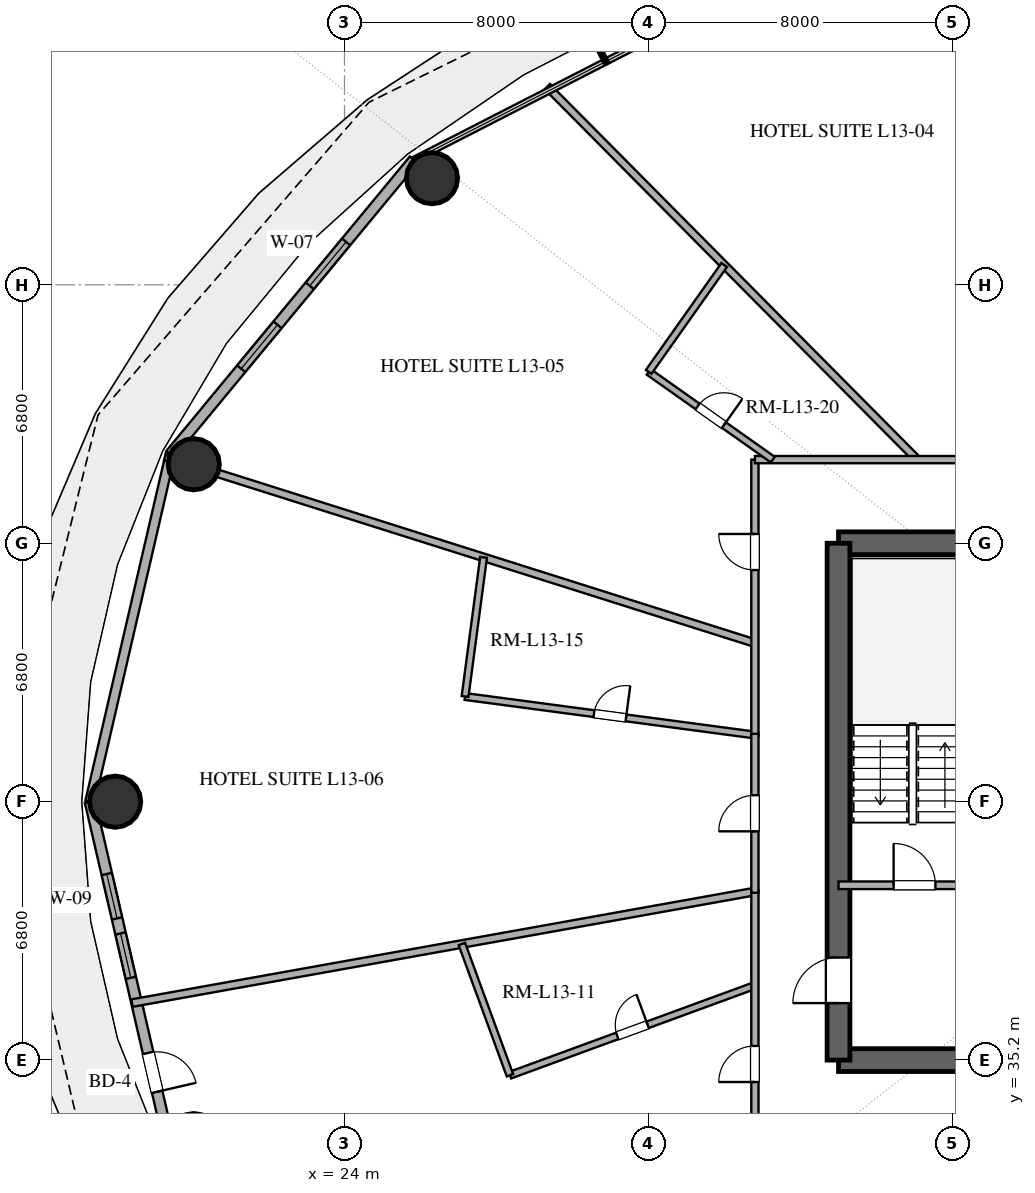
"""IFC4 building model, lengths in metres.
Left out: names, types, materials, properties, quantities, classifications, styles, units other than length and angle.
Written with IfcOpenShell. Run it as: python <this file> out.ifc"""

import sys

from ifc_helpers import new_model, si_unit, direction, frame, frame_2d, origin, origin_2d, place, context, subcontext, project, spatial, rectangle, hollow_circle, extrude, element, fill, save


model = new_model("IFC4")
c1 = context("Model", 3, precision=1e-05, world=origin(), true_north=direction((0.0, 1.0)))
c2 = subcontext(c1, "Body", "Model", "MODEL_VIEW")
j1 = project(units=[si_unit("LENGTHUNIT", "METRE"), si_unit("PLANEANGLEUNIT", "RADIAN")], contexts=[c1])
p1 = place(None, origin())
s1 = spatial("IfcSite", under=j1, at=p1, CompositionType="ELEMENT")
p2 = place(p1, origin())
s2 = spatial("IfcBuilding", under=s1, at=p2, CompositionType="ELEMENT")
p3 = place(p2, frame((0.0, 0.0, 57.0)))
s3 = spatial("IfcBuildingStorey", under=s2, at=p3, CompositionType="ELEMENT", Elevation=57.0)
for number, where, z_axis, x_axis in (
    (1, (37.0, 35.2, 0.0), (0.0, 0.0, 1.0), (1.0, 0.0, 0.0)),
    (2, (37.0, 48.8, 0.0), (0.0, 0.0, 1.0), (1.0, 0.0, 0.0)),
):
    element("IfcWall", number, at=place(p3, frame(where, z_axis=z_axis, x_axis=x_axis)), inside=s3, PredefinedType="SHEAR", context=c2, shape_type="SweptSolid", body=[
        extrude(rectangle(XDim=4.0, YDim=0.6, at=frame_2d((2.0, 0.0))), origin(), (0.0, 0.0, 1.0), 3.38),
    ])
p4 = place(p3, frame((37.0, 35.2, 0.0), z_axis=(0.0, 0.0, 1.0), x_axis=(0.0, 1.0, 0.0)))
e3 = element("IfcWall", 3, at=p4, inside=s3, PredefinedType="SHEAR", context=c2, shape_type="SweptSolid", body=[
    extrude(rectangle(XDim=13.6, YDim=0.6, at=frame_2d((6.8, 0.0))), origin(), (0.0, 0.0, 1.0), 3.38),
])
p5 = place(p4, frame((1.5, 0.0, 0.0)))
e4 = element("IfcOpeningElement", 4, at=p5, cuts=e3, PredefinedType="OPENING", context=c2, shape_type="SweptSolid", body=[
    extrude(rectangle(XDim=1.2, YDim=2.15, at=frame_2d((0.6, 1.075))), frame((0.0, 0.31, 0.0), z_axis=(0.0, -1.0, 0.0), x_axis=(1.0, 0.0, 0.0)), (0.0, 0.0, 1.0), 0.62),
])
for number, where, z_axis, x_axis in (
    (5, (26.303, 58.405, 0.0), (0.0, 0.0, 1.0), (1.0, 0.0, 0.0)),
    (6, (20.034, 50.878, 0.0), (0.0, 0.0, 1.0), (1.0, 0.0, 0.0)),
    (7, (17.965, 42.0, 0.0), (0.0, 0.0, 1.0), (1.0, 0.0, 0.0)),
):
    element("IfcColumn", number, at=place(p3, frame(where, z_axis=z_axis, x_axis=x_axis)), inside=s3, PredefinedType="COLUMN", context=c2, shape_type="SweptSolid", body=[
        extrude(hollow_circle(Radius=0.675, WallThickness=0.036, at=origin_2d()), origin(), (0.0, 0.0, 1.0), 3.38),
    ])
p6 = place(p3, frame((25.826, 58.886, 0.0), z_axis=(0.0, 0.0, 1.0), x_axis=(-0.637296809613, -0.770618437657, 0.0)))
e8 = element("IfcWall", 8, at=p6, inside=s3, PredefinedType="SOLIDWALL", context=c2, shape_type="SweptSolid", body=[
    extrude(rectangle(XDim=10.053, YDim=0.28, at=frame_2d((5.027, 0.0))), origin(), (0.0, 0.0, 1.0), 3.38),
])
p7 = place(p6, frame((2.798, 0.0, 0.85)))
e9 = element("IfcOpeningElement", 9, at=p7, cuts=e8, PredefinedType="OPENING", context=c2, shape_type="SweptSolid", body=[
    extrude(rectangle(XDim=1.5, YDim=1.8, at=frame_2d((0.75, 0.9))), frame((0.0, 0.15, 0.0), z_axis=(0.0, -1.0, 0.0), x_axis=(1.0, 0.0, 0.0)), (0.0, 0.0, 1.0), 0.3),
])
p8 = place(p6, frame((5.63, 0.0, 0.85)))
e10 = element("IfcOpeningElement", 10, at=p8, cuts=e8, PredefinedType="OPENING", context=c2, shape_type="SweptSolid", body=[
    extrude(rectangle(XDim=1.5, YDim=1.8, at=frame_2d((0.75, 0.9))), frame((0.0, 0.15, 0.0), z_axis=(0.0, -1.0, 0.0), x_axis=(1.0, 0.0, 0.0)), (0.0, 0.0, 1.0), 0.3),
])
p9 = place(p3, frame((19.419, 51.138, 0.0), z_axis=(0.0, 0.0, 1.0), x_axis=(-0.225454452941, -0.974253709076, 0.0)))
e11 = element("IfcWall", 11, at=p9, inside=s3, PredefinedType="SOLIDWALL", context=c2, shape_type="SweptSolid", body=[
    extrude(rectangle(XDim=9.38, YDim=0.25, at=frame_2d((4.69, 0.0))), origin(), (0.0, 0.0, 1.0), 3.38),
])
p10 = place(p3, frame((17.304, 42.0, 0.0), z_axis=(0.0, 0.0, 1.0), x_axis=(0.225454452941, -0.974253709076, 0.0)))
e12 = element("IfcWall", 12, at=p10, inside=s3, PredefinedType="SOLIDWALL", context=c2, shape_type="SweptSolid", body=[
    extrude(rectangle(XDim=9.38, YDim=0.28, at=frame_2d((4.69, 0.0))), origin(), (0.0, 0.0, 1.0), 3.38),
])
p11 = place(p10, frame((1.953, 0.0, 0.85)))
e13 = element("IfcOpeningElement", 13, at=p11, cuts=e12, PredefinedType="OPENING", context=c2, shape_type="SweptSolid", body=[
    extrude(rectangle(XDim=1.2, YDim=1.8, at=frame_2d((0.6, 0.9))), frame((0.0, 0.15, 0.0), z_axis=(0.0, -1.0, 0.0), x_axis=(1.0, 0.0, 0.0)), (0.0, 0.0, 1.0), 0.3),
])
p12 = place(p10, frame((3.558, 0.0, 0.85)))
e14 = element("IfcOpeningElement", 14, at=p12, cuts=e12, PredefinedType="OPENING", context=c2, shape_type="SweptSolid", body=[
    extrude(rectangle(XDim=1.2, YDim=1.8, at=frame_2d((0.6, 0.9))), frame((0.0, 0.15, 0.0), z_axis=(0.0, -1.0, 0.0), x_axis=(1.0, 0.0, 0.0)), (0.0, 0.0, 1.0), 0.3),
])
p13 = place(p10, frame((6.785, 0.0, 0.0)))
e15 = element("IfcOpeningElement", 15, at=p13, cuts=e12, PredefinedType="OPENING", context=c2, shape_type="SweptSolid", body=[
    extrude(rectangle(XDim=1.05, YDim=2.2, at=frame_2d((0.525, 1.1))), frame((0.0, 0.15, 0.0), z_axis=(0.0, -1.0, 0.0), x_axis=(1.0, 0.0, 0.0)), (0.0, 0.0, 1.0), 0.3),
])
p14 = place(p3, frame((37.0, 39.8, 0.0), z_axis=(0.0, 0.0, 1.0), x_axis=(1.0, 0.0, 0.0)))
e16 = element("IfcWall", 16, at=p14, inside=s3, PredefinedType="SOLIDWALL", context=c2, shape_type="SweptSolid", body=[
    extrude(rectangle(XDim=4.0, YDim=0.2, at=frame_2d((2.0, 0.0))), origin(), (0.0, 0.0, 1.0), 2.74),
])
p15 = place(p14, frame((1.45, 0.0, 0.0)))
e17 = element("IfcOpeningElement", 17, at=p15, cuts=e16, PredefinedType="OPENING", context=c2, shape_type="SweptSolid", body=[
    extrude(rectangle(XDim=1.1, YDim=2.15, at=frame_2d((0.55, 1.075))), frame((0.0, 0.11, 0.0), z_axis=(0.0, -1.0, 0.0), x_axis=(1.0, 0.0, 0.0)), (0.0, 0.0, 1.0), 0.22),
])
p16 = place(p3, frame((34.8, 39.636, 0.0), z_axis=(0.0, 0.0, 1.0), x_axis=(-0.984338200058, -0.176290407871, 0.0)))
e18 = element("IfcWall", 18, at=p16, inside=s3, PredefinedType="PARTITIONING", context=c2, shape_type="SweptSolid", body=[
    extrude(rectangle(XDim=16.653, YDim=0.2, at=frame_2d((8.327, 0.0))), origin(), (0.0, 0.0, 1.0), 2.74),
])
p17 = place(p3, frame((34.8, 46.172, 0.0), z_axis=(0.0, 0.0, 1.0), x_axis=(-0.953511676516, 0.301356073023, 0.0)))
e19 = element("IfcWall", 19, at=p17, inside=s3, PredefinedType="PARTITIONING", context=c2, shape_type="SweptSolid", body=[
    extrude(rectangle(XDim=16.275, YDim=0.2, at=frame_2d((8.137, 0.0))), origin(), (0.0, 0.0, 1.0), 2.74),
])
p18 = place(p3, frame((27.173, 44.768, 0.0), z_axis=(0.0, 0.0, 1.0), x_axis=(0.991283239225, -0.131748015661, 0.0)))
e20 = element("IfcWall", 20, at=p18, inside=s3, PredefinedType="PLUMBINGWALL", context=c2, shape_type="SweptSolid", body=[
    extrude(rectangle(XDim=7.694, YDim=0.18, at=frame_2d((3.847, 0.0))), origin(), (0.0, 0.0, 1.0), 2.74),
])
p19 = place(p18, frame((3.422, 0.0, 0.0)))
e21 = element("IfcOpeningElement", 21, at=p19, cuts=e20, PredefinedType="OPENING", context=c2, shape_type="SweptSolid", body=[
    extrude(rectangle(XDim=0.85, YDim=2.1, at=frame_2d((0.425, 1.05))), frame((0.0, 0.1, 0.0), z_axis=(0.0, -1.0, 0.0), x_axis=(1.0, 0.0, 0.0)), (0.0, 0.0, 1.0), 0.2),
])
p20 = place(p3, frame((39.072, 51.0, 0.0), z_axis=(0.0, 0.0, 1.0), x_axis=(-0.704257683765, 0.70994444491, 0.0)))
e22 = element("IfcWall", 22, at=p20, inside=s3, PredefinedType="PARTITIONING", context=c2, shape_type="SweptSolid", body=[
    extrude(rectangle(XDim=13.824, YDim=0.2, at=frame_2d((6.912, 0.0))), origin(), (0.0, 0.0, 1.0), 2.74),
])
p21 = place(p3, frame((28.354, 34.802, 0.0), z_axis=(0.0, 0.0, 1.0), x_axis=(0.938953689431, 0.344043556986, 0.0)))
e23 = element("IfcWall", 23, at=p21, inside=s3, PredefinedType="PLUMBINGWALL", context=c2, shape_type="SweptSolid", body=[
    extrude(rectangle(XDim=6.865, YDim=0.18, at=frame_2d((3.433, 0.0))), origin(), (0.0, 0.0, 1.0), 2.74),
])
p22 = place(p21, frame((3.007, 0.0, 0.0)))
e24 = element("IfcOpeningElement", 24, at=p22, cuts=e23, PredefinedType="OPENING", context=c2, shape_type="SweptSolid", body=[
    extrude(rectangle(XDim=0.85, YDim=2.1, at=frame_2d((0.425, 1.05))), frame((0.0, 0.1, 0.0), z_axis=(0.0, -1.0, 0.0), x_axis=(1.0, 0.0, 0.0)), (0.0, 0.0, 1.0), 0.2),
])
p23 = place(p3, frame((34.8, 43.722, 0.0), z_axis=(0.0, 0.0, 1.0), x_axis=(0.0, 1.0, 0.0)))
e25 = element("IfcWall", 25, at=p23, inside=s3, PredefinedType="PARTITIONING", context=c2, shape_type="SweptSolid", body=[
    extrude(rectangle(XDim=7.278, YDim=0.19, at=frame_2d((3.639, 0.0))), origin(), (0.0, 0.0, 1.0), 2.74),
])
p24 = place(p23, frame((4.372, 0.0, 0.0)))
e26 = element("IfcOpeningElement", 26, at=p24, cuts=e25, PredefinedType="OPENING", context=c2, shape_type="SweptSolid", body=[
    extrude(rectangle(XDim=0.95, YDim=2.15, at=frame_2d((0.475, 1.075))), frame((0.0, 0.105, 0.0), z_axis=(0.0, -1.0, 0.0), x_axis=(1.0, 0.0, 0.0)), (0.0, 0.0, 1.0), 0.21),
])
p25 = place(p3, frame((34.8, 51.0, 0.0), z_axis=(0.0, 0.0, 1.0), x_axis=(1.0, 0.0, 0.0)))
e27 = element("IfcWall", 27, at=p25, inside=s3, PredefinedType="PARTITIONING", context=c2, shape_type="SweptSolid", body=[
    extrude(rectangle(XDim=8.641, YDim=0.19, at=frame_2d((4.32, 0.0))), origin(), (0.0, 0.0, 1.0), 2.74),
])
p26 = place(p25, frame((5.959, 0.0, 0.0)))
e28 = element("IfcOpeningElement", 28, at=p26, cuts=e27, PredefinedType="OPENING", context=c2, shape_type="SweptSolid", body=[
    extrude(rectangle(XDim=0.95, YDim=2.15, at=frame_2d((0.475, 1.075))), frame((0.0, 0.105, 0.0), z_axis=(0.0, -1.0, 0.0), x_axis=(1.0, 0.0, 0.0)), (0.0, 0.0, 1.0), 0.21),
])
p27 = place(p3, frame((34.8, 33.0, 0.0), z_axis=(0.0, 0.0, 1.0), x_axis=(0.0, 1.0, 0.0)))
e29 = element("IfcWall", 29, at=p27, inside=s3, PredefinedType="PARTITIONING", context=c2, shape_type="SweptSolid", body=[
    extrude(rectangle(XDim=6.668, YDim=0.19, at=frame_2d((3.334, 0.0))), origin(), (0.0, 0.0, 1.0), 2.74),
])
p28 = place(p27, frame((1.624, 0.0, 0.0)))
e30 = element("IfcOpeningElement", 30, at=p28, cuts=e29, PredefinedType="OPENING", context=c2, shape_type="SweptSolid", body=[
    extrude(rectangle(XDim=0.95, YDim=2.15, at=frame_2d((0.475, 1.075))), frame((0.0, 0.105, 0.0), z_axis=(0.0, -1.0, 0.0), x_axis=(1.0, 0.0, 0.0)), (0.0, 0.0, 1.0), 0.21),
])
p29 = place(p3, frame((34.8, 39.604, 0.0), z_axis=(0.0, 0.0, 1.0), x_axis=(0.0, 1.0, 0.0)))
e31 = element("IfcWall", 31, at=p29, inside=s3, PredefinedType="PARTITIONING", context=c2, shape_type="SweptSolid", body=[
    extrude(rectangle(XDim=4.183, YDim=0.19, at=frame_2d((2.091, 0.0))), origin(), (0.0, 0.0, 1.0), 2.74),
])
p30 = place(p29, frame((1.616, 0.0, 0.0)))
e32 = element("IfcOpeningElement", 32, at=p30, cuts=e31, PredefinedType="OPENING", context=c2, shape_type="SweptSolid", body=[
    extrude(rectangle(XDim=0.95, YDim=2.15, at=frame_2d((0.475, 1.075))), frame((0.0, 0.105, 0.0), z_axis=(0.0, -1.0, 0.0), x_axis=(1.0, 0.0, 0.0)), (0.0, 0.0, 1.0), 0.21),
])
p31 = place(p3, frame((32.005, 53.309, 0.0), z_axis=(0.0, 0.0, 1.0), x_axis=(0.816524416543, -0.577310901672, 0.0)))
e33 = element("IfcWall", 33, at=p31, inside=s3, PredefinedType="PLUMBINGWALL", context=c2, shape_type="SweptSolid", body=[
    extrude(rectangle(XDim=4.0, YDim=0.18, at=frame_2d((2.0, 0.0))), origin(), (0.0, 0.0, 1.0), 2.74),
])
p32 = place(p31, frame((1.575, 0.0, 0.0)))
e34 = element("IfcOpeningElement", 34, at=p32, cuts=e33, PredefinedType="OPENING", context=c2, shape_type="SweptSolid", body=[
    extrude(rectangle(XDim=0.85, YDim=2.1, at=frame_2d((0.425, 1.05))), frame((0.0, 0.1, 0.0), z_axis=(0.0, -1.0, 0.0), x_axis=(1.0, 0.0, 0.0)), (0.0, 0.0, 1.0), 0.2),
])
p33 = place(p3, frame((27.66, 48.428, 0.0), z_axis=(0.0, 0.0, 1.0), x_axis=(-0.131760975246, -0.991281516726, 0.0)))
e35 = element("IfcWall", 35, at=p33, inside=s3, PredefinedType="PLUMBINGWALL", context=c2, shape_type="SweptSolid", body=[
    extrude(rectangle(XDim=3.693, YDim=0.18, at=frame_2d((1.846, 0.0))), origin(), (0.0, 0.0, 1.0), 2.74),
])
p34 = place(p3, frame((27.089, 38.255, 0.0), z_axis=(0.0, 0.0, 1.0), x_axis=(0.344012760863, -0.938964972916, 0.0)))
e36 = element("IfcWall", 36, at=p34, inside=s3, PredefinedType="PLUMBINGWALL", context=c2, shape_type="SweptSolid", body=[
    extrude(rectangle(XDim=3.677, YDim=0.18, at=frame_2d((1.839, 0.0))), origin(), (0.0, 0.0, 1.0), 2.74),
])
p35 = place(p3, frame((33.993, 56.121, 0.0), z_axis=(0.0, 0.0, 1.0), x_axis=(-0.57730102799, -0.816531397487, 0.0)))
e37 = element("IfcWall", 37, at=p35, inside=s3, PredefinedType="PLUMBINGWALL", context=c2, shape_type="SweptSolid", body=[
    extrude(rectangle(XDim=3.443, YDim=0.18, at=frame_2d((1.722, 0.0))), origin(), (0.0, 0.0, 1.0), 2.74),
])
p36 = place(p7, origin())
e38 = element("IfcWindow", 38, at=p36, inside=s3, PartitioningType="SINGLE_PANEL", PredefinedType="WINDOW", context=c2, shape_type="SweptSolid", body=[
    extrude(rectangle(XDim=1.5, YDim=1.8, at=frame_2d((0.75, 0.9))), frame((0.0, 0.03, 0.0), z_axis=(0.0, -1.0, 0.0), x_axis=(1.0, 0.0, 0.0)), (0.0, 0.0, 1.0), 0.06),
])
fill(e9, e38)
p37 = place(p8, origin())
e39 = element("IfcWindow", 39, at=p37, inside=s3, PartitioningType="SINGLE_PANEL", PredefinedType="WINDOW", context=c2, shape_type="SweptSolid", body=[
    extrude(rectangle(XDim=1.5, YDim=1.8, at=frame_2d((0.75, 0.9))), frame((0.0, 0.03, 0.0), z_axis=(0.0, -1.0, 0.0), x_axis=(1.0, 0.0, 0.0)), (0.0, 0.0, 1.0), 0.06),
])
fill(e10, e39)
p38 = place(p11, origin())
e40 = element("IfcWindow", 40, at=p38, inside=s3, PartitioningType="SINGLE_PANEL", PredefinedType="WINDOW", context=c2, shape_type="SweptSolid", body=[
    extrude(rectangle(XDim=1.2, YDim=1.8, at=frame_2d((0.6, 0.9))), frame((0.0, 0.03, 0.0), z_axis=(0.0, -1.0, 0.0), x_axis=(1.0, 0.0, 0.0)), (0.0, 0.0, 1.0), 0.06),
])
fill(e13, e40)
p39 = place(p12, origin())
e41 = element("IfcWindow", 41, at=p39, inside=s3, PartitioningType="SINGLE_PANEL", PredefinedType="WINDOW", context=c2, shape_type="SweptSolid", body=[
    extrude(rectangle(XDim=1.2, YDim=1.8, at=frame_2d((0.6, 0.9))), frame((0.0, 0.03, 0.0), z_axis=(0.0, -1.0, 0.0), x_axis=(1.0, 0.0, 0.0)), (0.0, 0.0, 1.0), 0.06),
])
fill(e14, e41)
p40 = place(p13, origin())
e42 = element("IfcDoor", 42, at=p40, inside=s3, OperationType="SINGLE_SWING_RIGHT", PredefinedType="DOOR", context=c2, shape_type="SweptSolid", body=[
    extrude(rectangle(XDim=1.05, YDim=2.2, at=frame_2d((0.525, 1.1))), frame((0.0, 0.025, 0.0), z_axis=(0.0, -1.0, 0.0), x_axis=(1.0, 0.0, 0.0)), (0.0, 0.0, 1.0), 0.05),
])
fill(e15, e42)
p41 = place(p5, origin())
e43 = element("IfcDoor", 43, at=p41, inside=s3, OperationType="SINGLE_SWING_LEFT", PredefinedType="DOOR", context=c2, shape_type="SweptSolid", body=[
    extrude(rectangle(XDim=1.2, YDim=2.15, at=frame_2d((0.6, 1.075))), frame((0.0, 0.025, 0.0), z_axis=(0.0, -1.0, 0.0), x_axis=(1.0, 0.0, 0.0)), (0.0, 0.0, 1.0), 0.05),
])
fill(e4, e43)
p42 = place(p15, origin())
e44 = element("IfcDoor", 44, at=p42, inside=s3, OperationType="SINGLE_SWING_LEFT", PredefinedType="DOOR", context=c2, shape_type="SweptSolid", body=[
    extrude(rectangle(XDim=1.1, YDim=2.15, at=frame_2d((0.55, 1.075))), frame((0.0, 0.025, 0.0), z_axis=(0.0, -1.0, 0.0), x_axis=(1.0, 0.0, 0.0)), (0.0, 0.0, 1.0), 0.05),
])
fill(e17, e44)
p43 = place(p19, origin())
e45 = element("IfcDoor", 45, at=p43, inside=s3, OperationType="SINGLE_SWING_RIGHT", PredefinedType="DOOR", context=c2, shape_type="SweptSolid", body=[
    extrude(rectangle(XDim=0.85, YDim=2.1, at=frame_2d((0.425, 1.05))), frame((0.0, 0.025, 0.0), z_axis=(0.0, -1.0, 0.0), x_axis=(1.0, 0.0, 0.0)), (0.0, 0.0, 1.0), 0.05),
])
fill(e21, e45)
p44 = place(p22, origin())
e46 = element("IfcDoor", 46, at=p44, inside=s3, OperationType="SINGLE_SWING_RIGHT", PredefinedType="DOOR", context=c2, shape_type="SweptSolid", body=[
    extrude(rectangle(XDim=0.85, YDim=2.1, at=frame_2d((0.425, 1.05))), frame((0.0, 0.025, 0.0), z_axis=(0.0, -1.0, 0.0), x_axis=(1.0, 0.0, 0.0)), (0.0, 0.0, 1.0), 0.05),
])
fill(e24, e46)
p45 = place(p24, origin())
e47 = element("IfcDoor", 47, at=p45, inside=s3, OperationType="SINGLE_SWING_RIGHT", PredefinedType="DOOR", context=c2, shape_type="SweptSolid", body=[
    extrude(rectangle(XDim=0.95, YDim=2.15, at=frame_2d((0.475, 1.075))), frame((0.0, 0.025, 0.0), z_axis=(0.0, -1.0, 0.0), x_axis=(1.0, 0.0, 0.0)), (0.0, 0.0, 1.0), 0.05),
])
fill(e26, e47)
p46 = place(p28, origin())
e48 = element("IfcDoor", 48, at=p46, inside=s3, OperationType="SINGLE_SWING_LEFT", PredefinedType="DOOR", context=c2, shape_type="SweptSolid", body=[
    extrude(rectangle(XDim=0.95, YDim=2.15, at=frame_2d((0.475, 1.075))), frame((0.0, 0.025, 0.0), z_axis=(0.0, -1.0, 0.0), x_axis=(1.0, 0.0, 0.0)), (0.0, 0.0, 1.0), 0.05),
])
fill(e30, e48)
p47 = place(p30, origin())
e49 = element("IfcDoor", 49, at=p47, inside=s3, OperationType="SINGLE_SWING_LEFT", PredefinedType="DOOR", context=c2, shape_type="SweptSolid", body=[
    extrude(rectangle(XDim=0.95, YDim=2.15, at=frame_2d((0.475, 1.075))), frame((0.0, 0.025, 0.0), z_axis=(0.0, -1.0, 0.0), x_axis=(1.0, 0.0, 0.0)), (0.0, 0.0, 1.0), 0.05),
])
fill(e32, e49)
p48 = place(p32, origin())
e50 = element("IfcDoor", 50, at=p48, inside=s3, OperationType="SINGLE_SWING_RIGHT", PredefinedType="DOOR", context=c2, shape_type="SweptSolid", body=[
    extrude(rectangle(XDim=0.85, YDim=2.1, at=frame_2d((0.425, 1.05))), frame((0.0, 0.025, 0.0), z_axis=(0.0, -1.0, 0.0), x_axis=(1.0, 0.0, 0.0)), (0.0, 0.0, 1.0), 0.05),
])
fill(e34, e50)
save(model, sys.argv[1])
